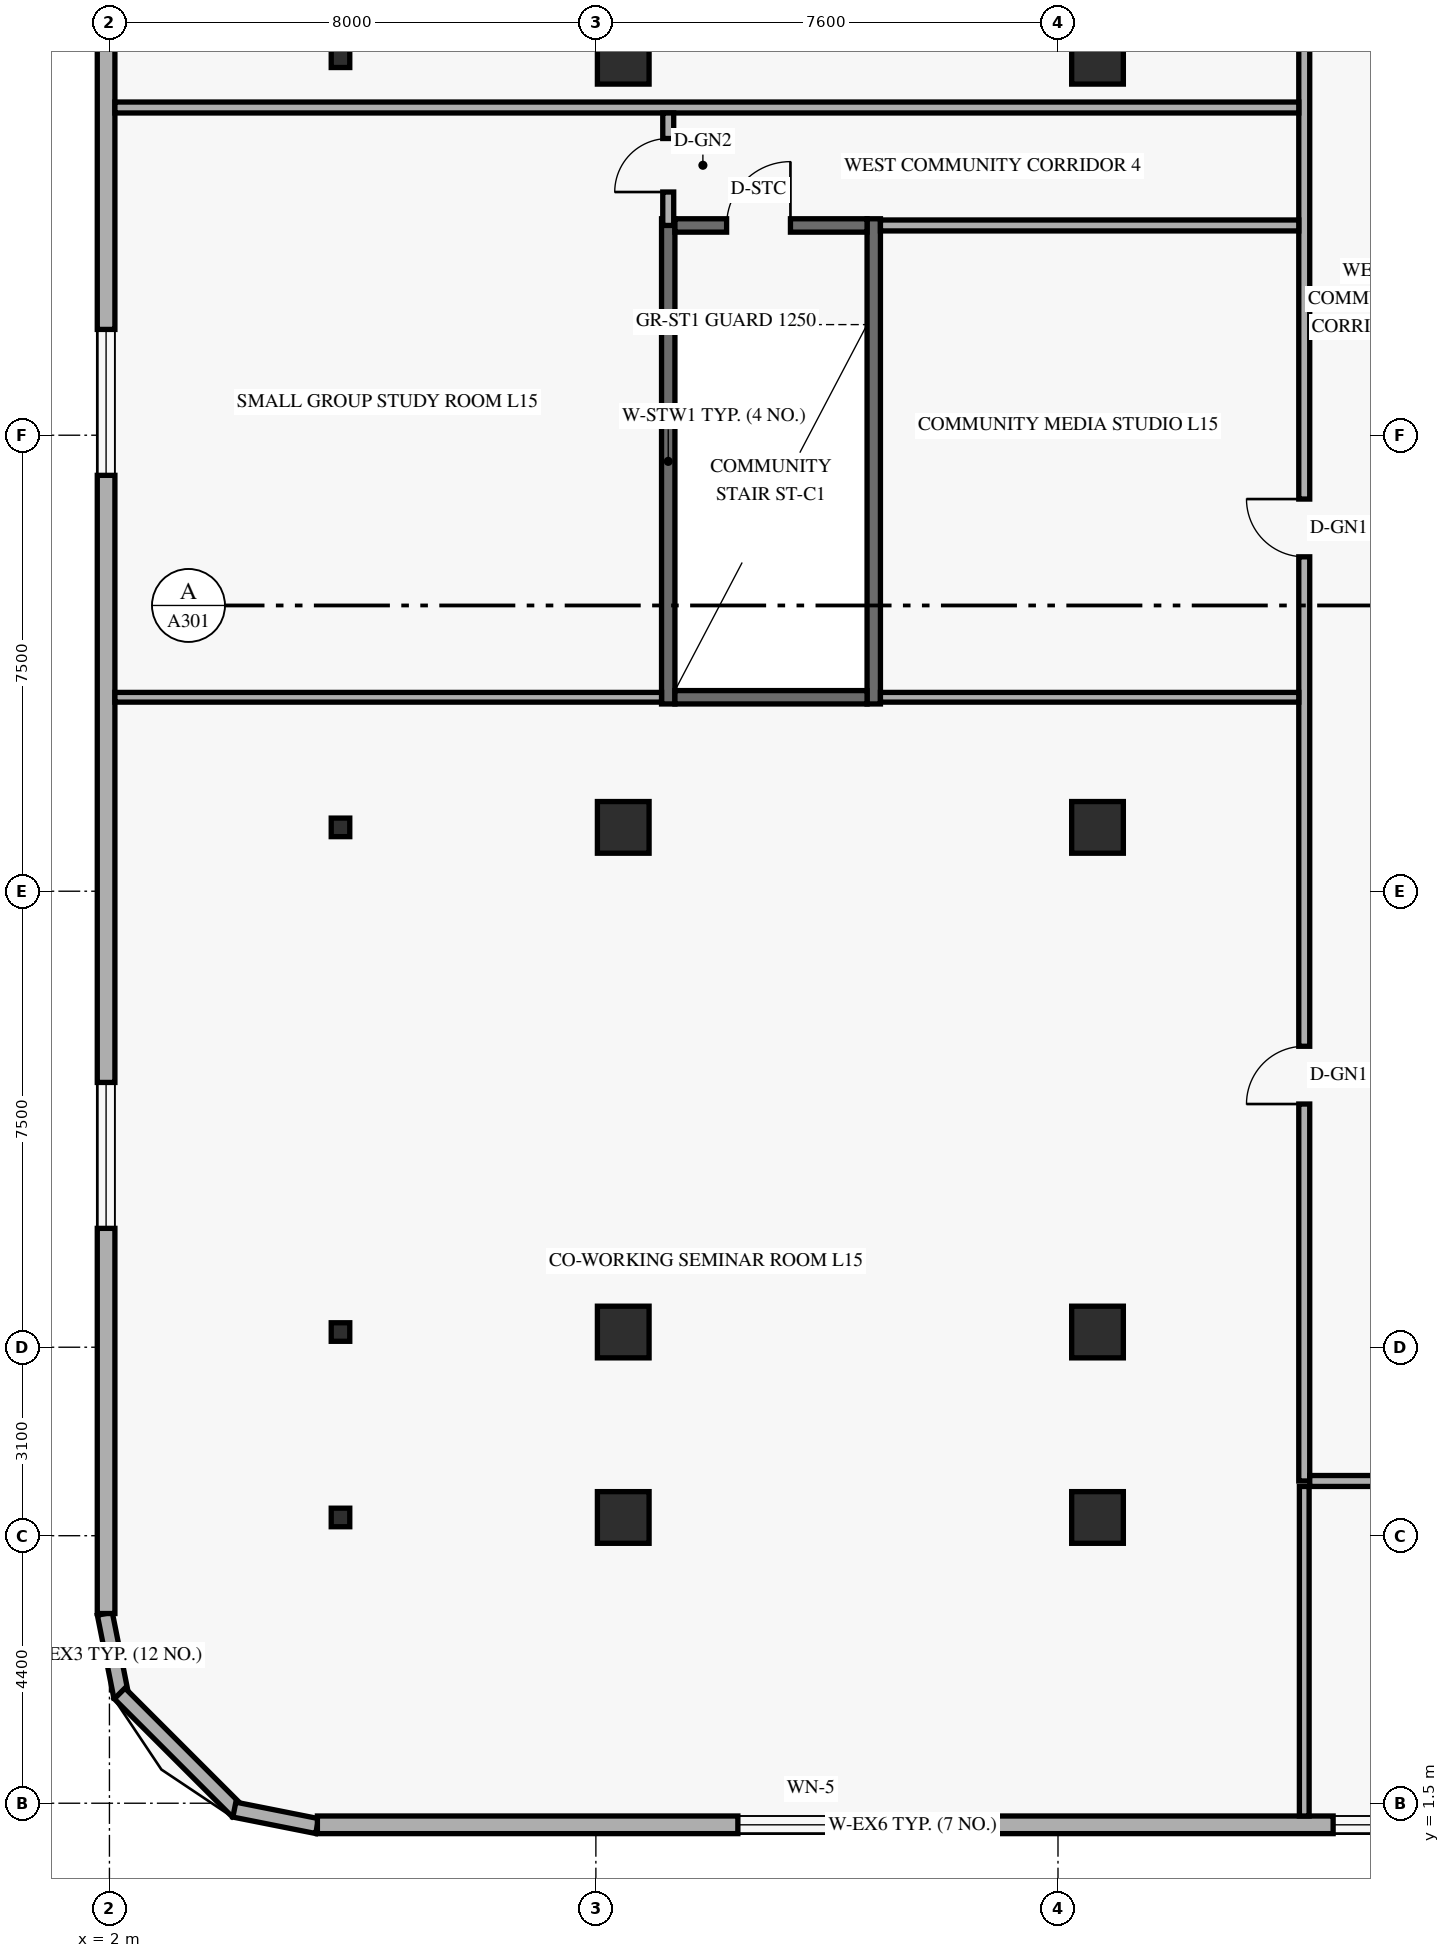
"""IFC4 building model, lengths in metres.
Left out: names, types, materials, properties, quantities, classifications, styles, units other than length and angle.
Written with IfcOpenShell. Run it as: python <this file> out.ifc"""

import sys

from ifc_helpers import new_model, si_unit, direction, frame, frame_2d, origin, origin_2d, place, context, subcontext, project, spatial, rectangle, hollow_rectangle, extrude, element, fill, save


model = new_model("IFC4")
c1 = context("Model", 3, precision=1e-05, world=origin(), true_north=direction((0.0, 1.0)))
c2 = subcontext(c1, "Body", "Model", "MODEL_VIEW")
j1 = project(units=[si_unit("LENGTHUNIT", "METRE"), si_unit("PLANEANGLEUNIT", "RADIAN")], contexts=[c1])
p1 = place(None, origin())
s1 = spatial("IfcSite", under=j1, at=p1, CompositionType="ELEMENT")
p2 = place(p1, origin())
s2 = spatial("IfcBuilding", under=s1, at=p2, CompositionType="ELEMENT")
p3 = place(p2, frame((0.0, 0.0, 60.0)))
s3 = spatial("IfcBuildingStorey", under=s2, at=p3, CompositionType="ELEMENT", Elevation=60.0)
for number, where, z_axis, x_axis in (
    (1, (11.19, 19.58, 0.0), (0.0, 0.0, 1.0), (0.0, 1.0, 0.0)),
    (2, (14.57, 19.58, 0.0), (0.0, 0.0, 1.0), (0.0, 1.0, 0.0)),
):
    element("IfcWall", number, at=place(p3, frame(where, z_axis=z_axis, x_axis=x_axis)), inside=s3, PredefinedType="SHEAR", context=c2, shape_type="SweptSolid", body=[
        extrude(rectangle(XDim=7.98, YDim=0.22, at=frame_2d((3.99, 0.0))), origin(), (0.0, 0.0, 1.0), 3.96),
    ])
p4 = place(p3, frame((11.3, 19.69, 0.0), z_axis=(0.0, 0.0, 1.0), x_axis=(1.0, 0.0, 0.0)))
e3 = element("IfcWall", 3, at=p4, inside=s3, PredefinedType="SHEAR", context=c2, shape_type="SweptSolid", body=[
    extrude(rectangle(XDim=3.16, YDim=0.22, at=frame_2d((1.58, 0.0))), origin(), (0.0, 0.0, 1.0), 3.96),
])
p5 = place(p3, frame((11.3, 27.45, 0.0), z_axis=(0.0, 0.0, 1.0), x_axis=(1.0, 0.0, 0.0)))
e4 = element("IfcWall", 4, at=p5, inside=s3, PredefinedType="SHEAR", context=c2, shape_type="SweptSolid", body=[
    extrude(rectangle(XDim=3.16, YDim=0.22, at=frame_2d((1.58, 0.0))), origin(), (0.0, 0.0, 1.0), 3.96),
])
p6 = place(p5, frame((0.85, 0.0, 0.0)))
e5 = element("IfcOpeningElement", 5, at=p6, cuts=e4, PredefinedType="OPENING", context=c2, shape_type="SweptSolid", body=[
    extrude(rectangle(XDim=1.05, YDim=2.15, at=frame_2d((0.525, 1.075))), frame((0.0, 0.12, 0.0), z_axis=(0.0, -1.0, 0.0), x_axis=(1.0, 0.0, 0.0)), (0.0, 0.0, 1.0), 0.24),
])
for number, where, z_axis, x_axis in (
    (6, (5.8, 6.2, 0.0), (0.0, 0.0, 1.0), (1.0, 0.0, 0.0)),
    (7, (5.8, 9.25, 0.0), (0.0, 0.0, 1.0), (1.0, 0.0, 0.0)),
    (8, (5.8, 17.55, 0.0), (0.0, 0.0, 1.0), (1.0, 0.0, 0.0)),
    (9, (5.8, 30.2, 0.0), (0.0, 0.0, 1.0), (1.0, 0.0, 0.0)),
):
    element("IfcColumn", number, at=place(p3, frame(where, z_axis=z_axis, x_axis=x_axis)), inside=s3, PredefinedType="COLUMN", context=c2, shape_type="SweptSolid", body=[
        extrude(hollow_rectangle(XDim=0.305, YDim=0.305, WallThickness=0.013, at=origin_2d()), origin(), (0.0, 0.0, 1.0), 4.2),
    ])
for number, where, z_axis, x_axis in (
    (10, (10.45, 6.2, 0.0), (0.0, 0.0, 1.0), (1.0, 0.0, 0.0)),
    (11, (10.45, 9.25, 0.0), (0.0, 0.0, 1.0), (1.0, 0.0, 0.0)),
    (12, (10.45, 17.55, 0.0), (0.0, 0.0, 1.0), (1.0, 0.0, 0.0)),
    (13, (10.45, 30.2, 0.0), (0.0, 0.0, 1.0), (1.0, 0.0, 0.0)),
    (14, (18.25, 6.2, 0.0), (0.0, 0.0, 1.0), (1.0, 0.0, 0.0)),
    (15, (18.25, 9.25, 0.0), (0.0, 0.0, 1.0), (1.0, 0.0, 0.0)),
    (16, (18.25, 17.55, 0.0), (0.0, 0.0, 1.0), (1.0, 0.0, 0.0)),
    (17, (18.25, 30.2, 0.0), (0.0, 0.0, 1.0), (1.0, 0.0, 0.0)),
):
    element("IfcColumn", number, at=place(p3, frame(where, z_axis=z_axis, x_axis=x_axis)), inside=s3, PredefinedType="COLUMN", context=c2, shape_type="SweptSolid", body=[
        extrude(rectangle(XDim=0.85, YDim=0.85, at=origin_2d()), origin(), (0.0, 0.0, 1.0), 4.2),
    ])
p7 = place(p3, frame((1.924, 4.616, 0.0), z_axis=(0.0, 0.0, 1.0), x_axis=(0.19496651342, -0.980809899341, 0.0)))
e18 = element("IfcWall", 18, at=p7, inside=s3, PredefinedType="SOLIDWALL", context=c2, shape_type="SweptSolid", body=[
    extrude(rectangle(XDim=1.389, YDim=0.25, at=frame_2d((0.694, 0.0))), origin(), (0.0, 0.0, 1.0), 3.96),
])
p8 = place(p3, frame((2.168, 3.305, 0.0), z_axis=(0.0, 0.0, 1.0), x_axis=(0.707106781187, -0.707106781187, 0.0)))
e19 = element("IfcWall", 19, at=p8, inside=s3, PredefinedType="SOLIDWALL", context=c2, shape_type="SweptSolid", body=[
    extrude(rectangle(XDim=2.739, YDim=0.25, at=frame_2d((1.37, 0.0))), origin(), (0.0, 0.0, 1.0), 3.96),
])
p9 = place(p3, frame((4.054, 1.395, 0.0), z_axis=(0.0, 0.0, 1.0), x_axis=(0.980809899341, -0.19496651342, 0.0)))
e20 = element("IfcWall", 20, at=p9, inside=s3, PredefinedType="SOLIDWALL", context=c2, shape_type="SweptSolid", body=[
    extrude(rectangle(XDim=1.389, YDim=0.25, at=frame_2d((0.694, 0.0))), origin(), (0.0, 0.0, 1.0), 3.96),
])
p10 = place(p3, frame((5.42, 1.145, 0.0), z_axis=(0.0, 0.0, 1.0), x_axis=(1.0, 0.0, 0.0)))
e21 = element("IfcWall", 21, at=p10, inside=s3, PredefinedType="SOLIDWALL", context=c2, shape_type="SweptSolid", body=[
    extrude(rectangle(XDim=19.58, YDim=0.29, at=frame_2d((9.79, 0.0))), origin(), (0.0, 0.0, 1.0), 3.96),
])
p11 = place(p10, frame((6.915, 0.0, 0.85)))
e22 = element("IfcOpeningElement", 22, at=p11, cuts=e21, PredefinedType="OPENING", context=c2, shape_type="SweptSolid", body=[
    extrude(rectangle(XDim=2.4, YDim=1.9, at=frame_2d((1.2, 0.95))), frame((0.0, 0.155, 0.0), z_axis=(0.0, -1.0, 0.0), x_axis=(1.0, 0.0, 0.0)), (0.0, 0.0, 1.0), 0.31),
])
p12 = place(p10, frame((16.705, 0.0, 0.85)))
e23 = element("IfcOpeningElement", 23, at=p12, cuts=e21, PredefinedType="OPENING", context=c2, shape_type="SweptSolid", body=[
    extrude(rectangle(XDim=2.4, YDim=1.9, at=frame_2d((1.2, 0.95))), frame((0.0, 0.155, 0.0), z_axis=(0.0, -1.0, 0.0), x_axis=(1.0, 0.0, 0.0)), (0.0, 0.0, 1.0), 0.31),
])
p13 = place(p3, frame((1.945, 43.38, 0.0), z_axis=(0.0, 0.0, 1.0), x_axis=(0.0, -1.0, 0.0)))
e24 = element("IfcWall", 24, at=p13, inside=s3, PredefinedType="SOLIDWALL", context=c2, shape_type="SweptSolid", body=[
    extrude(rectangle(XDim=38.76, YDim=0.29, at=frame_2d((19.38, 0.0))), origin(), (0.0, 0.0, 1.0), 3.96),
])
p14 = place(p13, frame((30.025, 0.0, 0.85)))
e25 = element("IfcOpeningElement", 25, at=p14, cuts=e24, PredefinedType="OPENING", context=c2, shape_type="SweptSolid", body=[
    extrude(rectangle(XDim=2.4, YDim=1.9, at=frame_2d((1.2, 0.95))), frame((0.0, 0.155, 0.0), z_axis=(0.0, -1.0, 0.0), x_axis=(1.0, 0.0, 0.0)), (0.0, 0.0, 1.0), 0.31),
])
p15 = place(p13, frame((17.64, 0.0, 0.85)))
e26 = element("IfcOpeningElement", 26, at=p15, cuts=e24, PredefinedType="OPENING", context=c2, shape_type="SweptSolid", body=[
    extrude(rectangle(XDim=2.4, YDim=1.9, at=frame_2d((1.2, 0.95))), frame((0.0, 0.155, 0.0), z_axis=(0.0, -1.0, 0.0), x_axis=(1.0, 0.0, 0.0)), (0.0, 0.0, 1.0), 0.31),
])
p16 = place(p13, frame((5.795, 0.0, 0.85)))
e27 = element("IfcOpeningElement", 27, at=p16, cuts=e24, PredefinedType="OPENING", context=c2, shape_type="SweptSolid", body=[
    extrude(rectangle(XDim=2.4, YDim=1.9, at=frame_2d((1.2, 0.95))), frame((0.0, 0.155, 0.0), z_axis=(0.0, -1.0, 0.0), x_axis=(1.0, 0.0, 0.0)), (0.0, 0.0, 1.0), 0.31),
])
p17 = place(p3, frame((21.65, 6.8, 0.0), z_axis=(0.0, 0.0, 1.0), x_axis=(0.0, 1.0, 0.0)))
e28 = element("IfcWall", 28, at=p17, inside=s3, PredefinedType="STANDARD", context=c2, shape_type="SweptSolid", body=[
    extrude(rectangle(XDim=34.4, YDim=0.18, at=frame_2d((17.2, 0.0))), origin(), (0.0, 0.0, 1.0), 3.249),
])
p18 = place(p17, frame((15.2, 0.0, 0.0)))
e29 = element("IfcOpeningElement", 29, at=p18, cuts=e28, PredefinedType="OPENING", context=c2, shape_type="SweptSolid", body=[
    extrude(rectangle(XDim=0.95, YDim=2.15, at=frame_2d((0.475, 1.075))), frame((0.0, 0.1, 0.0), z_axis=(0.0, -1.0, 0.0), x_axis=(1.0, 0.0, 0.0)), (0.0, 0.0, 1.0), 0.2),
])
p19 = place(p17, frame((6.2, 0.0, 0.0)))
e30 = element("IfcOpeningElement", 30, at=p19, cuts=e28, PredefinedType="OPENING", context=c2, shape_type="SweptSolid", body=[
    extrude(rectangle(XDim=0.95, YDim=2.15, at=frame_2d((0.475, 1.075))), frame((0.0, 0.1, 0.0), z_axis=(0.0, -1.0, 0.0), x_axis=(1.0, 0.0, 0.0)), (0.0, 0.0, 1.0), 0.2),
])
p20 = place(p17, frame((26.5, 0.0, 0.0)))
e31 = element("IfcOpeningElement", 31, at=p20, cuts=e28, PredefinedType="OPENING", context=c2, shape_type="SweptSolid", body=[
    extrude(rectangle(XDim=0.95, YDim=2.15, at=frame_2d((0.475, 1.075))), frame((0.0, 0.1, 0.0), z_axis=(0.0, -1.0, 0.0), x_axis=(1.0, 0.0, 0.0)), (0.0, 0.0, 1.0), 0.2),
])
p21 = place(p3, frame((21.74, 6.8, 0.0), z_axis=(0.0, 0.0, 1.0), x_axis=(1.0, 0.0, 0.0)))
e32 = element("IfcWall", 32, at=p21, inside=s3, PredefinedType="STANDARD", context=c2, shape_type="SweptSolid", body=[
    extrude(rectangle(XDim=15.57, YDim=0.18, at=frame_2d((7.785, 0.0))), origin(), (0.0, 0.0, 1.0), 3.249),
])
p22 = place(p21, frame((5.41, 0.0, 0.0)))
e33 = element("IfcOpeningElement", 33, at=p22, cuts=e32, PredefinedType="OPENING", context=c2, shape_type="SweptSolid", body=[
    extrude(rectangle(XDim=0.95, YDim=2.15, at=frame_2d((0.475, 1.075))), frame((0.0, 0.1, 0.0), z_axis=(0.0, -1.0, 0.0), x_axis=(1.0, 0.0, 0.0)), (0.0, 0.0, 1.0), 0.2),
])
p23 = place(p3, frame((21.65, 1.29, 0.0), z_axis=(0.0, 0.0, 1.0), x_axis=(0.0, 1.0, 0.0)))
e34 = element("IfcWall", 34, at=p23, inside=s3, PredefinedType="PARTITIONING", context=c2, shape_type="SweptSolid", body=[
    extrude(rectangle(XDim=5.42, YDim=0.16, at=frame_2d((2.71, 0.0))), origin(), (0.0, 0.0, 1.0), 3.409),
])
p24 = place(p3, frame((14.68, 27.45, 0.0), z_axis=(0.0, 0.0, 1.0), x_axis=(1.0, 0.0, 0.0)))
e35 = element("IfcWall", 35, at=p24, inside=s3, PredefinedType="STANDARD", context=c2, shape_type="SweptSolid", body=[
    extrude(rectangle(XDim=6.88, YDim=0.18, at=frame_2d((3.44, 0.0))), origin(), (0.0, 0.0, 1.0), 3.249),
])
p25 = place(p3, frame((2.09, 29.39, 0.0), z_axis=(0.0, 0.0, 1.0), x_axis=(1.0, 0.0, 0.0)))
e36 = element("IfcWall", 36, at=p25, inside=s3, PredefinedType="STANDARD", context=c2, shape_type="SweptSolid", body=[
    extrude(rectangle(XDim=19.47, YDim=0.18, at=frame_2d((9.735, 0.0))), origin(), (0.0, 0.0, 1.0), 3.249),
])
p26 = place(p3, frame((11.19, 27.45, 0.0), z_axis=(0.0, 0.0, 1.0), x_axis=(0.0, 1.0, 0.0)))
e37 = element("IfcWall", 37, at=p26, inside=s3, PredefinedType="STANDARD", context=c2, shape_type="SweptSolid", body=[
    extrude(rectangle(XDim=1.85, YDim=0.18, at=frame_2d((0.925, 0.0))), origin(), (0.0, 0.0, 1.0), 3.96),
])
p27 = place(p26, frame((0.55, 0.0, 0.0)))
e38 = element("IfcOpeningElement", 38, at=p27, cuts=e37, PredefinedType="OPENING", context=c2, shape_type="SweptSolid", body=[
    extrude(rectangle(XDim=0.88, YDim=2.12, at=frame_2d((0.44, 1.06))), frame((0.0, 0.1, 0.0), z_axis=(0.0, -1.0, 0.0), x_axis=(1.0, 0.0, 0.0)), (0.0, 0.0, 1.0), 0.2),
])
p28 = place(p3, frame((2.09, 19.69, 0.0), z_axis=(0.0, 0.0, 1.0), x_axis=(1.0, 0.0, 0.0)))
e39 = element("IfcWall", 39, at=p28, inside=s3, PredefinedType="PARTITIONING", context=c2, shape_type="SweptSolid", body=[
    extrude(rectangle(XDim=8.99, YDim=0.16, at=frame_2d((4.495, 0.0))), origin(), (0.0, 0.0, 1.0), 3.249),
])
p29 = place(p3, frame((14.68, 19.69, 0.0), z_axis=(0.0, 0.0, 1.0), x_axis=(1.0, 0.0, 0.0)))
e40 = element("IfcWall", 40, at=p29, inside=s3, PredefinedType="PARTITIONING", context=c2, shape_type="SweptSolid", body=[
    extrude(rectangle(XDim=6.88, YDim=0.16, at=frame_2d((3.44, 0.0))), origin(), (0.0, 0.0, 1.0), 3.249),
])
p30 = place(p11, origin())
e41 = element("IfcWindow", 41, at=p30, inside=s3, PartitioningType="SINGLE_PANEL", PredefinedType="WINDOW", context=c2, shape_type="SweptSolid", body=[
    extrude(rectangle(XDim=2.4, YDim=1.9, at=frame_2d((1.2, 0.95))), frame((0.0, 0.03, 0.0), z_axis=(0.0, -1.0, 0.0), x_axis=(1.0, 0.0, 0.0)), (0.0, 0.0, 1.0), 0.06),
])
fill(e22, e41)
p31 = place(p12, origin())
e42 = element("IfcWindow", 42, at=p31, inside=s3, PartitioningType="SINGLE_PANEL", PredefinedType="WINDOW", context=c2, shape_type="SweptSolid", body=[
    extrude(rectangle(XDim=2.4, YDim=1.9, at=frame_2d((1.2, 0.95))), frame((0.0, 0.03, 0.0), z_axis=(0.0, -1.0, 0.0), x_axis=(1.0, 0.0, 0.0)), (0.0, 0.0, 1.0), 0.06),
])
fill(e23, e42)
p32 = place(p14, origin())
e43 = element("IfcWindow", 43, at=p32, inside=s3, PartitioningType="SINGLE_PANEL", PredefinedType="WINDOW", context=c2, shape_type="SweptSolid", body=[
    extrude(rectangle(XDim=2.4, YDim=1.9, at=frame_2d((1.2, 0.95))), frame((0.0, 0.03, 0.0), z_axis=(0.0, -1.0, 0.0), x_axis=(1.0, 0.0, 0.0)), (0.0, 0.0, 1.0), 0.06),
])
fill(e25, e43)
p33 = place(p15, origin())
e44 = element("IfcWindow", 44, at=p33, inside=s3, PartitioningType="SINGLE_PANEL", PredefinedType="WINDOW", context=c2, shape_type="SweptSolid", body=[
    extrude(rectangle(XDim=2.4, YDim=1.9, at=frame_2d((1.2, 0.95))), frame((0.0, 0.03, 0.0), z_axis=(0.0, -1.0, 0.0), x_axis=(1.0, 0.0, 0.0)), (0.0, 0.0, 1.0), 0.06),
])
fill(e26, e44)
p34 = place(p6, frame((1.05, 0.0, 0.0), z_axis=(0.0, 0.0, 1.0), x_axis=(-1.0, 0.0, 0.0)))
e45 = element("IfcDoor", 45, at=p34, inside=s3, OperationType="SINGLE_SWING_LEFT", PredefinedType="DOOR", context=c2, shape_type="SweptSolid", body=[
    extrude(rectangle(XDim=1.05, YDim=2.15, at=frame_2d((0.525, 1.075))), frame((0.0, 0.025, 0.0), z_axis=(0.0, -1.0, 0.0), x_axis=(1.0, 0.0, 0.0)), (0.0, 0.0, 1.0), 0.05),
])
fill(e5, e45)
p35 = place(p27, origin())
e46 = element("IfcDoor", 46, at=p35, inside=s3, OperationType="SINGLE_SWING_LEFT", PredefinedType="DOOR", context=c2, shape_type="SweptSolid", body=[
    extrude(rectangle(XDim=0.88, YDim=2.12, at=frame_2d((0.44, 1.06))), frame((0.0, 0.025, 0.0), z_axis=(0.0, -1.0, 0.0), x_axis=(1.0, 0.0, 0.0)), (0.0, 0.0, 1.0), 0.05),
])
fill(e38, e46)
p36 = place(p18, origin())
e47 = element("IfcDoor", 47, at=p36, inside=s3, OperationType="SINGLE_SWING_RIGHT", PredefinedType="DOOR", context=c2, shape_type="SweptSolid", body=[
    extrude(rectangle(XDim=0.95, YDim=2.15, at=frame_2d((0.475, 1.075))), frame((0.0, 0.025, 0.0), z_axis=(0.0, -1.0, 0.0), x_axis=(1.0, 0.0, 0.0)), (0.0, 0.0, 1.0), 0.05),
])
fill(e29, e47)
p37 = place(p19, origin())
e48 = element("IfcDoor", 48, at=p37, inside=s3, OperationType="SINGLE_SWING_LEFT", PredefinedType="DOOR", context=c2, shape_type="SweptSolid", body=[
    extrude(rectangle(XDim=0.95, YDim=2.15, at=frame_2d((0.475, 1.075))), frame((0.0, 0.025, 0.0), z_axis=(0.0, -1.0, 0.0), x_axis=(1.0, 0.0, 0.0)), (0.0, 0.0, 1.0), 0.05),
])
fill(e30, e48)
save(model, sys.argv[1])
